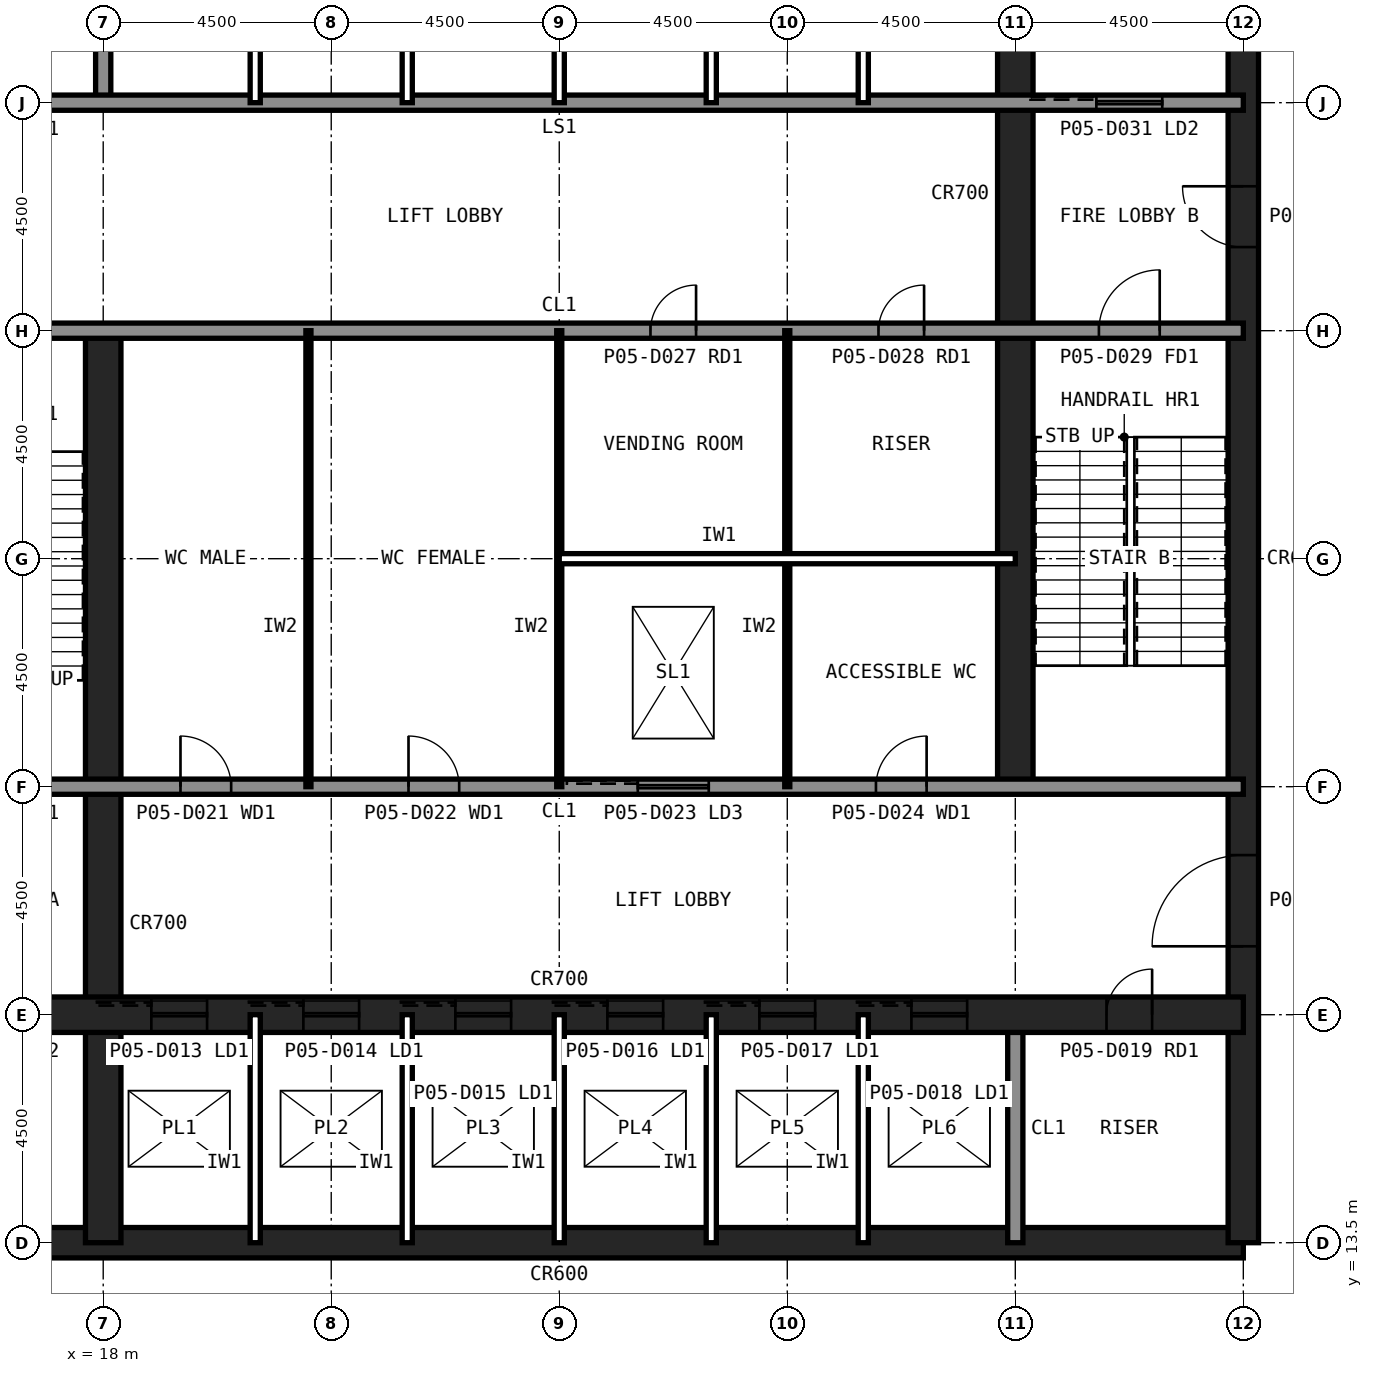
"""IFC4 building model, lengths in metres.
Left out: names, types, materials, properties, quantities, classifications, styles, units other than length and angle.
Written with IfcOpenShell. Run it as: python <this file> out.ifc"""

import sys

from ifc_helpers import new_model, si_unit, direction, frame, frame_2d, origin, place, context, subcontext, project, spatial, rectangle, extrude, element, fill, save


model = new_model("IFC4")
c1 = context("Model", 3, precision=1e-05, world=origin(), true_north=direction((0.0, 1.0)))
c2 = subcontext(c1, "Body", "Model", "MODEL_VIEW")
j1 = project(units=[si_unit("LENGTHUNIT", "METRE"), si_unit("PLANEANGLEUNIT", "RADIAN")], contexts=[c1])
p1 = place(None, origin())
s1 = spatial("IfcSite", under=j1, at=p1, CompositionType="ELEMENT")
p2 = place(p1, origin())
s2 = spatial("IfcBuilding", under=s1, at=p2, CompositionType="ELEMENT")
p3 = place(p2, frame((0.0, 0.0, 23.0)))
s3 = spatial("IfcBuildingStorey", under=s2, at=p3, CompositionType="ELEMENT", Elevation=23.0)
p4 = place(p3, frame((13.5, 13.5, 0.0), z_axis=(0.0, 0.0, 1.0), x_axis=(1.0, 0.0, 0.0)))
e1 = element("IfcWall", 1, at=p4, inside=s3, PredefinedType="SHEAR", context=c2, shape_type="SweptSolid", body=[
    extrude(rectangle(XDim=27.0, YDim=0.6, at=frame_2d((13.5, 0.0))), origin(), (0.0, 0.0, 1.0), 6.0),
])
p5 = place(p3, frame((40.5, 13.5, 0.0), z_axis=(0.0, 0.0, 1.0), x_axis=(0.0, 1.0, 0.0)))
e2 = element("IfcWall", 2, at=p5, inside=s3, PredefinedType="SHEAR", context=c2, shape_type="SweptSolid", body=[
    extrude(rectangle(XDim=27.0, YDim=0.6, at=frame_2d((13.5, 0.0))), origin(), (0.0, 0.0, 1.0), 6.0),
])
p6 = place(p5, frame((5.85, 0.0, 0.0)))
e3 = element("IfcOpeningElement", 3, at=p6, cuts=e2, PredefinedType="OPENING", context=c2, shape_type="SweptSolid", body=[
    extrude(rectangle(XDim=1.8, YDim=2.1, at=frame_2d((0.9, 1.05))), frame((0.0, 0.31, 0.0), z_axis=(0.0, -1.0, 0.0), x_axis=(1.0, 0.0, 0.0)), (0.0, 0.0, 1.0), 0.62),
])
p7 = place(p5, frame((19.65, 0.0, 0.0)))
e4 = element("IfcOpeningElement", 4, at=p7, cuts=e2, PredefinedType="OPENING", context=c2, shape_type="SweptSolid", body=[
    extrude(rectangle(XDim=1.2, YDim=2.1, at=frame_2d((0.6, 1.05))), frame((0.0, 0.31, 0.0), z_axis=(0.0, -1.0, 0.0), x_axis=(1.0, 0.0, 0.0)), (0.0, 0.0, 1.0), 0.62),
])
p8 = place(p3, frame((18.0, 13.5, 0.0), z_axis=(0.0, 0.0, 1.0), x_axis=(0.0, 1.0, 0.0)))
e5 = element("IfcWall", 5, at=p8, inside=s3, PredefinedType="SHEAR", context=c2, shape_type="SweptSolid", body=[
    extrude(rectangle(XDim=18.0, YDim=0.7, at=frame_2d((9.0, 0.0))), origin(), (0.0, 0.0, 1.0), 6.0),
])
for number, where, z_axis, x_axis in (
    (6, (18.0, 36.0, 0.0), (0.0, 0.0, 1.0), (0.0, 1.0, 0.0)),
    (7, (36.0, 13.5, 0.0), (0.0, 0.0, 1.0), (0.0, 1.0, 0.0)),
):
    element("IfcWall", number, at=place(p3, frame(where, z_axis=z_axis, x_axis=x_axis)), inside=s3, PredefinedType="SOLIDWALL", context=c2, shape_type="SweptSolid", body=[
        extrude(rectangle(XDim=4.5, YDim=0.3, at=frame_2d((2.25, 0.0))), origin(), (0.0, 0.0, 1.0), 5.84),
    ])
p9 = place(p3, frame((36.0, 22.5, 0.0), z_axis=(0.0, 0.0, 1.0), x_axis=(0.0, 1.0, 0.0)))
e8 = element("IfcWall", 8, at=p9, inside=s3, PredefinedType="SHEAR", context=c2, shape_type="SweptSolid", body=[
    extrude(rectangle(XDim=18.0, YDim=0.7, at=frame_2d((9.0, 0.0))), origin(), (0.0, 0.0, 1.0), 6.0),
])
p10 = place(p3, frame((13.5, 18.0, 0.0), z_axis=(0.0, 0.0, 1.0), x_axis=(1.0, 0.0, 0.0)))
e9 = element("IfcWall", 9, at=p10, inside=s3, PredefinedType="SHEAR", context=c2, shape_type="SweptSolid", body=[
    extrude(rectangle(XDim=27.0, YDim=0.7, at=frame_2d((13.5, 0.0))), origin(), (0.0, 0.0, 1.0), 6.0),
])
p11 = place(p10, frame((24.3, 0.0, 0.0)))
e10 = element("IfcOpeningElement", 10, at=p11, cuts=e9, PredefinedType="OPENING", context=c2, shape_type="SweptSolid", body=[
    extrude(rectangle(XDim=0.9, YDim=2.1, at=frame_2d((0.45, 1.05))), frame((0.0, 0.36, 0.0), z_axis=(0.0, -1.0, 0.0), x_axis=(1.0, 0.0, 0.0)), (0.0, 0.0, 1.0), 0.72),
])
p12 = place(p10, frame((5.45, 0.0, 0.0)))
e11 = element("IfcOpeningElement", 11, at=p12, cuts=e9, PredefinedType="OPENING", context=c2, shape_type="SweptSolid", body=[
    extrude(rectangle(XDim=1.1, YDim=2.1, at=frame_2d((0.55, 1.05))), frame((0.0, 0.36, 0.0), z_axis=(0.0, -1.0, 0.0), x_axis=(1.0, 0.0, 0.0)), (0.0, 0.0, 1.0), 0.72),
])
p13 = place(p10, frame((8.45, 0.0, 0.0)))
e12 = element("IfcOpeningElement", 12, at=p13, cuts=e9, PredefinedType="OPENING", context=c2, shape_type="SweptSolid", body=[
    extrude(rectangle(XDim=1.1, YDim=2.1, at=frame_2d((0.55, 1.05))), frame((0.0, 0.36, 0.0), z_axis=(0.0, -1.0, 0.0), x_axis=(1.0, 0.0, 0.0)), (0.0, 0.0, 1.0), 0.72),
])
p14 = place(p10, frame((11.45, 0.0, 0.0)))
e13 = element("IfcOpeningElement", 13, at=p14, cuts=e9, PredefinedType="OPENING", context=c2, shape_type="SweptSolid", body=[
    extrude(rectangle(XDim=1.1, YDim=2.1, at=frame_2d((0.55, 1.05))), frame((0.0, 0.36, 0.0), z_axis=(0.0, -1.0, 0.0), x_axis=(1.0, 0.0, 0.0)), (0.0, 0.0, 1.0), 0.72),
])
p15 = place(p10, frame((14.45, 0.0, 0.0)))
e14 = element("IfcOpeningElement", 14, at=p15, cuts=e9, PredefinedType="OPENING", context=c2, shape_type="SweptSolid", body=[
    extrude(rectangle(XDim=1.1, YDim=2.1, at=frame_2d((0.55, 1.05))), frame((0.0, 0.36, 0.0), z_axis=(0.0, -1.0, 0.0), x_axis=(1.0, 0.0, 0.0)), (0.0, 0.0, 1.0), 0.72),
])
p16 = place(p10, frame((17.45, 0.0, 0.0)))
e15 = element("IfcOpeningElement", 15, at=p16, cuts=e9, PredefinedType="OPENING", context=c2, shape_type="SweptSolid", body=[
    extrude(rectangle(XDim=1.1, YDim=2.1, at=frame_2d((0.55, 1.05))), frame((0.0, 0.36, 0.0), z_axis=(0.0, -1.0, 0.0), x_axis=(1.0, 0.0, 0.0)), (0.0, 0.0, 1.0), 0.72),
])
p17 = place(p10, frame((20.45, 0.0, 0.0)))
e16 = element("IfcOpeningElement", 16, at=p17, cuts=e9, PredefinedType="OPENING", context=c2, shape_type="SweptSolid", body=[
    extrude(rectangle(XDim=1.1, YDim=2.1, at=frame_2d((0.55, 1.05))), frame((0.0, 0.36, 0.0), z_axis=(0.0, -1.0, 0.0), x_axis=(1.0, 0.0, 0.0)), (0.0, 0.0, 1.0), 0.72),
])
p18 = place(p10, frame((1.6, 0.0, 0.0)))
e17 = element("IfcOpeningElement", 17, at=p18, cuts=e9, PredefinedType="OPENING", context=c2, shape_type="SweptSolid", body=[
    extrude(rectangle(XDim=1.3, YDim=2.2, at=frame_2d((0.65, 1.1))), frame((0.0, 0.36, 0.0), z_axis=(0.0, -1.0, 0.0), x_axis=(1.0, 0.0, 0.0)), (0.0, 0.0, 1.0), 0.72),
])
p19 = place(p3, frame((13.5, 36.0, 0.0), z_axis=(0.0, 0.0, 1.0), x_axis=(1.0, 0.0, 0.0)))
e18 = element("IfcWall", 18, at=p19, inside=s3, PredefinedType="SOLIDWALL", context=c2, shape_type="SweptSolid", body=[
    extrude(rectangle(XDim=27.0, YDim=0.3, at=frame_2d((13.5, 0.0))), origin(), (0.0, 0.0, 1.0), 5.84),
])
p20 = place(p19, frame((1.8, 0.0, 0.0)))
e19 = element("IfcOpeningElement", 19, at=p20, cuts=e18, PredefinedType="OPENING", context=c2, shape_type="SweptSolid", body=[
    extrude(rectangle(XDim=0.9, YDim=2.1, at=frame_2d((0.45, 1.05))), frame((0.0, 0.16, 0.0), z_axis=(0.0, -1.0, 0.0), x_axis=(1.0, 0.0, 0.0)), (0.0, 0.0, 1.0), 0.32),
])
p21 = place(p19, frame((24.1, 0.0, 0.0)))
e20 = element("IfcOpeningElement", 20, at=p21, cuts=e18, PredefinedType="OPENING", context=c2, shape_type="SweptSolid", body=[
    extrude(rectangle(XDim=1.3, YDim=2.2, at=frame_2d((0.65, 1.1))), frame((0.0, 0.16, 0.0), z_axis=(0.0, -1.0, 0.0), x_axis=(1.0, 0.0, 0.0)), (0.0, 0.0, 1.0), 0.32),
])
p22 = place(p3, frame((13.5, 22.5, 0.0), z_axis=(0.0, 0.0, 1.0), x_axis=(1.0, 0.0, 0.0)))
e21 = element("IfcWall", 21, at=p22, inside=s3, PredefinedType="SOLIDWALL", context=c2, shape_type="SweptSolid", body=[
    extrude(rectangle(XDim=27.0, YDim=0.3, at=frame_2d((13.5, 0.0))), origin(), (0.0, 0.0, 1.0), 5.84),
])
p23 = place(p22, frame((1.65, 0.0, 0.0)))
e22 = element("IfcOpeningElement", 22, at=p23, cuts=e21, PredefinedType="OPENING", context=c2, shape_type="SweptSolid", body=[
    extrude(rectangle(XDim=1.2, YDim=2.1, at=frame_2d((0.6, 1.05))), frame((0.0, 0.16, 0.0), z_axis=(0.0, -1.0, 0.0), x_axis=(1.0, 0.0, 0.0)), (0.0, 0.0, 1.0), 0.32),
])
p24 = place(p22, frame((6.025, 0.0, 0.0)))
e23 = element("IfcOpeningElement", 23, at=p24, cuts=e21, PredefinedType="OPENING", context=c2, shape_type="SweptSolid", body=[
    extrude(rectangle(XDim=1.0, YDim=2.1, at=frame_2d((0.5, 1.05))), frame((0.0, 0.16, 0.0), z_axis=(0.0, -1.0, 0.0), x_axis=(1.0, 0.0, 0.0)), (0.0, 0.0, 1.0), 0.32),
])
p25 = place(p22, frame((10.525, 0.0, 0.0)))
e24 = element("IfcOpeningElement", 24, at=p25, cuts=e21, PredefinedType="OPENING", context=c2, shape_type="SweptSolid", body=[
    extrude(rectangle(XDim=1.0, YDim=2.1, at=frame_2d((0.5, 1.05))), frame((0.0, 0.16, 0.0), z_axis=(0.0, -1.0, 0.0), x_axis=(1.0, 0.0, 0.0)), (0.0, 0.0, 1.0), 0.32),
])
p26 = place(p22, frame((19.75, 0.0, 0.0)))
e25 = element("IfcOpeningElement", 25, at=p26, cuts=e21, PredefinedType="OPENING", context=c2, shape_type="SweptSolid", body=[
    extrude(rectangle(XDim=1.0, YDim=2.1, at=frame_2d((0.5, 1.05))), frame((0.0, 0.16, 0.0), z_axis=(0.0, -1.0, 0.0), x_axis=(1.0, 0.0, 0.0)), (0.0, 0.0, 1.0), 0.32),
])
p27 = place(p22, frame((15.05, 0.0, 0.0)))
e26 = element("IfcOpeningElement", 26, at=p27, cuts=e21, PredefinedType="OPENING", context=c2, shape_type="SweptSolid", body=[
    extrude(rectangle(XDim=1.4, YDim=2.4, at=frame_2d((0.7, 1.2))), frame((0.0, 0.16, 0.0), z_axis=(0.0, -1.0, 0.0), x_axis=(1.0, 0.0, 0.0)), (0.0, 0.0, 1.0), 0.32),
])
p28 = place(p3, frame((13.5, 31.5, 0.0), z_axis=(0.0, 0.0, 1.0), x_axis=(1.0, 0.0, 0.0)))
e27 = element("IfcWall", 27, at=p28, inside=s3, PredefinedType="SOLIDWALL", context=c2, shape_type="SweptSolid", body=[
    extrude(rectangle(XDim=27.0, YDim=0.3, at=frame_2d((13.5, 0.0))), origin(), (0.0, 0.0, 1.0), 5.84),
])
p29 = place(p28, frame((24.15, 0.0, 0.0)))
e28 = element("IfcOpeningElement", 28, at=p29, cuts=e27, PredefinedType="OPENING", context=c2, shape_type="SweptSolid", body=[
    extrude(rectangle(XDim=1.2, YDim=2.1, at=frame_2d((0.6, 1.05))), frame((0.0, 0.16, 0.0), z_axis=(0.0, -1.0, 0.0), x_axis=(1.0, 0.0, 0.0)), (0.0, 0.0, 1.0), 0.32),
])
p30 = place(p28, frame((15.3, 0.0, 0.0)))
e29 = element("IfcOpeningElement", 29, at=p30, cuts=e27, PredefinedType="OPENING", context=c2, shape_type="SweptSolid", body=[
    extrude(rectangle(XDim=0.9, YDim=2.1, at=frame_2d((0.45, 1.05))), frame((0.0, 0.16, 0.0), z_axis=(0.0, -1.0, 0.0), x_axis=(1.0, 0.0, 0.0)), (0.0, 0.0, 1.0), 0.32),
])
p31 = place(p28, frame((19.8, 0.0, 0.0)))
e30 = element("IfcOpeningElement", 30, at=p31, cuts=e27, PredefinedType="OPENING", context=c2, shape_type="SweptSolid", body=[
    extrude(rectangle(XDim=0.9, YDim=2.1, at=frame_2d((0.45, 1.05))), frame((0.0, 0.16, 0.0), z_axis=(0.0, -1.0, 0.0), x_axis=(1.0, 0.0, 0.0)), (0.0, 0.0, 1.0), 0.32),
])
for number, where, z_axis, x_axis in (
    (31, (21.0, 13.5, 0.0), (0.0, 0.0, 1.0), (0.0, 1.0, 0.0)),
    (32, (21.0, 36.0, 0.0), (0.0, 0.0, 1.0), (0.0, 1.0, 0.0)),
    (33, (24.0, 13.5, 0.0), (0.0, 0.0, 1.0), (0.0, 1.0, 0.0)),
    (34, (24.0, 36.0, 0.0), (0.0, 0.0, 1.0), (0.0, 1.0, 0.0)),
    (35, (27.0, 13.5, 0.0), (0.0, 0.0, 1.0), (0.0, 1.0, 0.0)),
    (36, (27.0, 36.0, 0.0), (0.0, 0.0, 1.0), (0.0, 1.0, 0.0)),
    (37, (30.0, 13.5, 0.0), (0.0, 0.0, 1.0), (0.0, 1.0, 0.0)),
    (38, (30.0, 36.0, 0.0), (0.0, 0.0, 1.0), (0.0, 1.0, 0.0)),
    (39, (33.0, 13.5, 0.0), (0.0, 0.0, 1.0), (0.0, 1.0, 0.0)),
    (40, (33.0, 36.0, 0.0), (0.0, 0.0, 1.0), (0.0, 1.0, 0.0)),
):
    element("IfcWall", number, at=place(p3, frame(where, z_axis=z_axis, x_axis=x_axis)), inside=s3, PredefinedType="PARTITIONING", context=c2, shape_type="SweptSolid", body=[
        extrude(rectangle(XDim=4.5, YDim=0.2, at=frame_2d((2.25, 0.0))), origin(), (0.0, 0.0, 1.0), 5.84),
    ])
for number, where, z_axis, x_axis in (
    (41, (22.05, 22.5, 0.0), (0.0, 0.0, 1.0), (0.0, 1.0, 0.0)),
    (42, (27.0, 22.5, 0.0), (0.0, 0.0, 1.0), (0.0, 1.0, 0.0)),
    (43, (31.5, 22.5, 0.0), (0.0, 0.0, 1.0), (0.0, 1.0, 0.0)),
):
    element("IfcWall", number, at=place(p3, frame(where, z_axis=z_axis, x_axis=x_axis)), inside=s3, PredefinedType="PLUMBINGWALL", context=c2, shape_type="SweptSolid", body=[
        extrude(rectangle(XDim=9.0, YDim=0.1, at=frame_2d((4.5, 0.0))), origin(), (0.0, 0.0, 1.0), 5.84),
    ])
p32 = place(p3, frame((27.0, 27.0, 0.0), z_axis=(0.0, 0.0, 1.0), x_axis=(1.0, 0.0, 0.0)))
e44 = element("IfcWall", 44, at=p32, inside=s3, PredefinedType="PARTITIONING", context=c2, shape_type="SweptSolid", body=[
    extrude(rectangle(XDim=9.0, YDim=0.2, at=frame_2d((4.5, 0.0))), origin(), (0.0, 0.0, 1.0), 5.84),
])
p33 = place(p6, origin())
e45 = element("IfcDoor", 45, at=p33, inside=s3, OperationType="SINGLE_SWING_LEFT", PredefinedType="DOOR", context=c2, shape_type="SweptSolid", body=[
    extrude(rectangle(XDim=1.8, YDim=2.1, at=frame_2d((0.9, 1.05))), frame((0.0, 0.025, 0.0), z_axis=(0.0, -1.0, 0.0), x_axis=(1.0, 0.0, 0.0)), (0.0, 0.0, 1.0), 0.05),
])
fill(e3, e45)
p34 = place(p7, origin())
e46 = element("IfcDoor", 46, at=p34, inside=s3, OperationType="SINGLE_SWING_RIGHT", PredefinedType="DOOR", context=c2, shape_type="SweptSolid", body=[
    extrude(rectangle(XDim=1.2, YDim=2.1, at=frame_2d((0.6, 1.05))), frame((0.0, 0.025, 0.0), z_axis=(0.0, -1.0, 0.0), x_axis=(1.0, 0.0, 0.0)), (0.0, 0.0, 1.0), 0.05),
])
fill(e4, e46)
p35 = place(p29, origin())
e47 = element("IfcDoor", 47, at=p35, inside=s3, OperationType="SINGLE_SWING_RIGHT", PredefinedType="DOOR", context=c2, shape_type="SweptSolid", body=[
    extrude(rectangle(XDim=1.2, YDim=2.1, at=frame_2d((0.6, 1.05))), frame((0.0, 0.025, 0.0), z_axis=(0.0, -1.0, 0.0), x_axis=(1.0, 0.0, 0.0)), (0.0, 0.0, 1.0), 0.05),
])
fill(e28, e47)
p36 = place(p24, origin())
e48 = element("IfcDoor", 48, at=p36, inside=s3, OperationType="SINGLE_SWING_LEFT", PredefinedType="DOOR", context=c2, shape_type="SweptSolid", body=[
    extrude(rectangle(XDim=1.0, YDim=2.1, at=frame_2d((0.5, 1.05))), frame((0.0, 0.025, 0.0), z_axis=(0.0, -1.0, 0.0), x_axis=(1.0, 0.0, 0.0)), (0.0, 0.0, 1.0), 0.05),
])
fill(e23, e48)
p37 = place(p25, origin())
e49 = element("IfcDoor", 49, at=p37, inside=s3, OperationType="SINGLE_SWING_LEFT", PredefinedType="DOOR", context=c2, shape_type="SweptSolid", body=[
    extrude(rectangle(XDim=1.0, YDim=2.1, at=frame_2d((0.5, 1.05))), frame((0.0, 0.025, 0.0), z_axis=(0.0, -1.0, 0.0), x_axis=(1.0, 0.0, 0.0)), (0.0, 0.0, 1.0), 0.05),
])
fill(e24, e49)
p38 = place(p26, origin())
e50 = element("IfcDoor", 50, at=p38, inside=s3, OperationType="SINGLE_SWING_RIGHT", PredefinedType="DOOR", context=c2, shape_type="SweptSolid", body=[
    extrude(rectangle(XDim=1.0, YDim=2.1, at=frame_2d((0.5, 1.05))), frame((0.0, 0.025, 0.0), z_axis=(0.0, -1.0, 0.0), x_axis=(1.0, 0.0, 0.0)), (0.0, 0.0, 1.0), 0.05),
])
fill(e25, e50)
p39 = place(p30, origin())
e51 = element("IfcDoor", 51, at=p39, inside=s3, OperationType="SINGLE_SWING_RIGHT", PredefinedType="DOOR", context=c2, shape_type="SweptSolid", body=[
    extrude(rectangle(XDim=0.9, YDim=2.1, at=frame_2d((0.45, 1.05))), frame((0.0, 0.025, 0.0), z_axis=(0.0, -1.0, 0.0), x_axis=(1.0, 0.0, 0.0)), (0.0, 0.0, 1.0), 0.05),
])
fill(e29, e51)
p40 = place(p31, origin())
e52 = element("IfcDoor", 52, at=p40, inside=s3, OperationType="SINGLE_SWING_RIGHT", PredefinedType="DOOR", context=c2, shape_type="SweptSolid", body=[
    extrude(rectangle(XDim=0.9, YDim=2.1, at=frame_2d((0.45, 1.05))), frame((0.0, 0.025, 0.0), z_axis=(0.0, -1.0, 0.0), x_axis=(1.0, 0.0, 0.0)), (0.0, 0.0, 1.0), 0.05),
])
fill(e30, e52)
p41 = place(p11, origin())
e53 = element("IfcDoor", 53, at=p41, inside=s3, OperationType="SINGLE_SWING_RIGHT", PredefinedType="DOOR", context=c2, shape_type="SweptSolid", body=[
    extrude(rectangle(XDim=0.9, YDim=2.1, at=frame_2d((0.45, 1.05))), frame((0.0, 0.025, 0.0), z_axis=(0.0, -1.0, 0.0), x_axis=(1.0, 0.0, 0.0)), (0.0, 0.0, 1.0), 0.05),
])
fill(e10, e53)
p42 = place(p12, origin())
e54 = element("IfcDoor", 54, at=p42, inside=s3, OperationType="SLIDING_TO_LEFT", PredefinedType="DOOR", context=c2, shape_type="SweptSolid", body=[
    extrude(rectangle(XDim=1.1, YDim=2.1, at=frame_2d((0.55, 1.05))), frame((0.0, 0.025, 0.0), z_axis=(0.0, -1.0, 0.0), x_axis=(1.0, 0.0, 0.0)), (0.0, 0.0, 1.0), 0.05),
])
fill(e11, e54)
p43 = place(p13, origin())
e55 = element("IfcDoor", 55, at=p43, inside=s3, OperationType="SLIDING_TO_LEFT", PredefinedType="DOOR", context=c2, shape_type="SweptSolid", body=[
    extrude(rectangle(XDim=1.1, YDim=2.1, at=frame_2d((0.55, 1.05))), frame((0.0, 0.025, 0.0), z_axis=(0.0, -1.0, 0.0), x_axis=(1.0, 0.0, 0.0)), (0.0, 0.0, 1.0), 0.05),
])
fill(e12, e55)
p44 = place(p14, origin())
e56 = element("IfcDoor", 56, at=p44, inside=s3, OperationType="SLIDING_TO_LEFT", PredefinedType="DOOR", context=c2, shape_type="SweptSolid", body=[
    extrude(rectangle(XDim=1.1, YDim=2.1, at=frame_2d((0.55, 1.05))), frame((0.0, 0.025, 0.0), z_axis=(0.0, -1.0, 0.0), x_axis=(1.0, 0.0, 0.0)), (0.0, 0.0, 1.0), 0.05),
])
fill(e13, e56)
p45 = place(p15, origin())
e57 = element("IfcDoor", 57, at=p45, inside=s3, OperationType="SLIDING_TO_LEFT", PredefinedType="DOOR", context=c2, shape_type="SweptSolid", body=[
    extrude(rectangle(XDim=1.1, YDim=2.1, at=frame_2d((0.55, 1.05))), frame((0.0, 0.025, 0.0), z_axis=(0.0, -1.0, 0.0), x_axis=(1.0, 0.0, 0.0)), (0.0, 0.0, 1.0), 0.05),
])
fill(e14, e57)
p46 = place(p16, origin())
e58 = element("IfcDoor", 58, at=p46, inside=s3, OperationType="SLIDING_TO_LEFT", PredefinedType="DOOR", context=c2, shape_type="SweptSolid", body=[
    extrude(rectangle(XDim=1.1, YDim=2.1, at=frame_2d((0.55, 1.05))), frame((0.0, 0.025, 0.0), z_axis=(0.0, -1.0, 0.0), x_axis=(1.0, 0.0, 0.0)), (0.0, 0.0, 1.0), 0.05),
])
fill(e15, e58)
p47 = place(p17, origin())
e59 = element("IfcDoor", 59, at=p47, inside=s3, OperationType="SLIDING_TO_LEFT", PredefinedType="DOOR", context=c2, shape_type="SweptSolid", body=[
    extrude(rectangle(XDim=1.1, YDim=2.1, at=frame_2d((0.55, 1.05))), frame((0.0, 0.025, 0.0), z_axis=(0.0, -1.0, 0.0), x_axis=(1.0, 0.0, 0.0)), (0.0, 0.0, 1.0), 0.05),
])
fill(e16, e59)
p48 = place(p21, origin())
e60 = element("IfcDoor", 60, at=p48, inside=s3, OperationType="SLIDING_TO_LEFT", PredefinedType="DOOR", context=c2, shape_type="SweptSolid", body=[
    extrude(rectangle(XDim=1.3, YDim=2.2, at=frame_2d((0.65, 1.1))), frame((0.0, 0.025, 0.0), z_axis=(0.0, -1.0, 0.0), x_axis=(1.0, 0.0, 0.0)), (0.0, 0.0, 1.0), 0.05),
])
fill(e20, e60)
p49 = place(p27, origin())
e61 = element("IfcDoor", 61, at=p49, inside=s3, OperationType="SLIDING_TO_LEFT", PredefinedType="DOOR", context=c2, shape_type="SweptSolid", body=[
    extrude(rectangle(XDim=1.4, YDim=2.4, at=frame_2d((0.7, 1.2))), frame((0.0, 0.025, 0.0), z_axis=(0.0, -1.0, 0.0), x_axis=(1.0, 0.0, 0.0)), (0.0, 0.0, 1.0), 0.05),
])
fill(e26, e61)
save(model, sys.argv[1])
